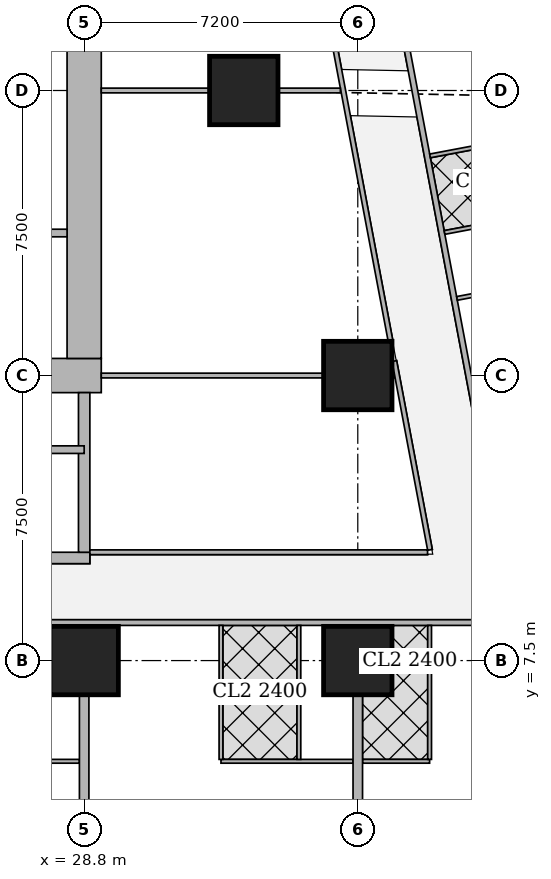
"""IFC4 building model, lengths in metres.
Left out: names, types, materials, properties, quantities, classifications, styles, units other than length and angle.
Written with IfcOpenShell. Run it as: python <this file> out.ifc"""

import sys

from ifc_helpers import new_model, si_unit, direction, frame, frame_2d, origin, origin_2d, place, context, subcontext, project, spatial, rectangle, extrude, element, fill, save


model = new_model("IFC4")
c1 = context("Model", 3, precision=1e-05, world=origin(), true_north=direction((0.0, 1.0)))
c2 = subcontext(c1, "Body", "Model", "MODEL_VIEW")
j1 = project(units=[si_unit("LENGTHUNIT", "METRE"), si_unit("PLANEANGLEUNIT", "RADIAN")], contexts=[c1])
p1 = place(None, origin())
s1 = spatial("IfcSite", under=j1, at=p1, CompositionType="ELEMENT")
p2 = place(p1, origin())
s2 = spatial("IfcBuilding", under=s1, at=p2, CompositionType="ELEMENT")
p3 = place(p2, frame((0.0, 0.0, 42.5)))
s3 = spatial("IfcBuildingStorey", under=s2, at=p3, CompositionType="ELEMENT", Elevation=42.5)
for number, where, z_axis, x_axis in (
    (1, (28.8, 7.5, 0.0), (0.0, 0.0, 1.0), (1.0, 0.0, 0.0)),
    (2, (36.0, 7.5, 0.0), (0.0, 0.0, 1.0), (1.0, 0.0, 0.0)),
    (3, (36.0, 15.0, 0.0), (0.0, 0.0, 1.0), (1.0, 0.0, 0.0)),
    (4, (33.0, 22.5, 0.0), (0.0, 0.0, 1.0), (1.0, 0.0, 0.0)),
):
    element("IfcColumn", number, at=place(p3, frame(where, z_axis=z_axis, x_axis=x_axis)), inside=s3, PredefinedType="COLUMN", context=c2, shape_type="SweptSolid", body=[
        extrude(rectangle(XDim=1.8, YDim=1.8, at=origin_2d()), origin(), (0.0, 0.0, 1.0), 3.75),
    ])
p4 = place(p3, frame((13.95, 15.0, 0.0), z_axis=(0.0, 0.0, 1.0), x_axis=(1.0, 0.0, 0.0)))
e5 = element("IfcWall", 5, at=p4, inside=s3, PredefinedType="SHEAR", context=c2, shape_type="SweptSolid", body=[
    extrude(rectangle(XDim=15.3, YDim=0.9, at=frame_2d((7.65, 0.0))), origin(), (0.0, 0.0, 1.0), 3.75),
])
p5 = place(p4, frame((4.45, 0.0, 0.0)))
e6 = element("IfcOpeningElement", 6, at=p5, cuts=e5, PredefinedType="OPENING", context=c2, shape_type="SweptSolid", body=[
    extrude(rectangle(XDim=1.8, YDim=2.1, at=frame_2d((0.9, 1.05))), frame((0.0, 0.46, 0.0), z_axis=(0.0, -1.0, 0.0), x_axis=(1.0, 0.0, 0.0)), (0.0, 0.0, 1.0), 0.92),
])
p6 = place(p4, frame((10.7, 0.0, 0.0)))
e7 = element("IfcOpeningElement", 7, at=p6, cuts=e5, PredefinedType="OPENING", context=c2, shape_type="SweptSolid", body=[
    extrude(rectangle(XDim=1.1, YDim=2.1, at=frame_2d((0.55, 1.05))), frame((0.0, 0.46, 0.0), z_axis=(0.0, -1.0, 0.0), x_axis=(1.0, 0.0, 0.0)), (0.0, 0.0, 1.0), 0.92),
])
p7 = place(p3, frame((28.8, 15.45, 0.0), z_axis=(0.0, 0.0, 1.0), x_axis=(0.0, 1.0, 0.0)))
e8 = element("IfcWall", 8, at=p7, inside=s3, PredefinedType="SHEAR", context=c2, shape_type="SweptSolid", body=[
    extrude(rectangle(XDim=14.1, YDim=0.9, at=frame_2d((7.05, 0.0))), origin(), (0.0, 0.0, 1.0), 3.75),
])
p8 = place(p3, frame((21.45, 10.2, 0.0), z_axis=(0.0, 0.0, 1.0), x_axis=(1.0, 0.0, 0.0)))
e9 = element("IfcWall", 9, at=p8, inside=s3, PredefinedType="SHEAR", context=c2, shape_type="SweptSolid", body=[
    extrude(rectangle(XDim=7.5, YDim=0.3, at=frame_2d((3.75, 0.0))), origin(), (0.0, 0.0, 1.0), 3.75),
])
p9 = place(p8, frame((0.5, 0.0, 0.0)))
e10 = element("IfcOpeningElement", 10, at=p9, cuts=e9, PredefinedType="OPENING", context=c2, shape_type="SweptSolid", body=[
    extrude(rectangle(XDim=1.1, YDim=2.1, at=frame_2d((0.55, 1.05))), frame((0.0, 0.16, 0.0), z_axis=(0.0, -1.0, 0.0), x_axis=(1.0, 0.0, 0.0)), (0.0, 0.0, 1.0), 0.32),
])
p10 = place(p3, frame((28.8, 10.35, 0.0), z_axis=(0.0, 0.0, 1.0), x_axis=(0.0, 1.0, 0.0)))
e11 = element("IfcWall", 11, at=p10, inside=s3, PredefinedType="SHEAR", context=c2, shape_type="SweptSolid", body=[
    extrude(rectangle(XDim=4.2, YDim=0.3, at=frame_2d((2.1, 0.0))), origin(), (0.0, 0.0, 1.0), 3.75),
])
p11 = place(p3, frame((40.054, 8.5, 0.0), z_axis=(0.0, 0.0, 1.0), x_axis=(-1.0, 0.0, 0.0)))
e12 = element("IfcWall", 12, at=p11, inside=s3, PredefinedType="SOLIDWALL", context=c2, shape_type="SweptSolid", body=[
    extrude(rectangle(XDim=31.704, YDim=0.15, at=frame_2d((15.852, 0.0))), origin(), (0.0, 0.0, 1.0), 3.5),
])
p12 = place(p11, frame((27.321, 0.0, 0.0)))
e13 = element("IfcOpeningElement", 13, at=p12, cuts=e12, PredefinedType="OPENING", context=c2, shape_type="SweptSolid", body=[
    extrude(rectangle(XDim=1.0, YDim=2.1, at=frame_2d((0.5, 1.05))), frame((0.0, 0.085, 0.0), z_axis=(0.0, -1.0, 0.0), x_axis=(1.0, 0.0, 0.0)), (0.0, 0.0, 1.0), 0.17),
])
p13 = place(p11, frame((23.054, 0.0, 0.0)))
e14 = element("IfcOpeningElement", 14, at=p13, cuts=e12, PredefinedType="OPENING", context=c2, shape_type="SweptSolid", body=[
    extrude(rectangle(XDim=1.0, YDim=2.1, at=frame_2d((0.5, 1.05))), frame((0.0, 0.085, 0.0), z_axis=(0.0, -1.0, 0.0), x_axis=(1.0, 0.0, 0.0)), (0.0, 0.0, 1.0), 0.17),
])
p14 = place(p11, frame((15.854, 0.0, 0.0)))
e15 = element("IfcOpeningElement", 15, at=p14, cuts=e12, PredefinedType="OPENING", context=c2, shape_type="SweptSolid", body=[
    extrude(rectangle(XDim=1.0, YDim=2.1, at=frame_2d((0.5, 1.05))), frame((0.0, 0.085, 0.0), z_axis=(0.0, -1.0, 0.0), x_axis=(1.0, 0.0, 0.0)), (0.0, 0.0, 1.0), 0.17),
])
p15 = place(p11, frame((8.654, 0.0, 0.0)))
e16 = element("IfcOpeningElement", 16, at=p15, cuts=e12, PredefinedType="OPENING", context=c2, shape_type="SweptSolid", body=[
    extrude(rectangle(XDim=1.0, YDim=2.1, at=frame_2d((0.5, 1.05))), frame((0.0, 0.085, 0.0), z_axis=(0.0, -1.0, 0.0), x_axis=(1.0, 0.0, 0.0)), (0.0, 0.0, 1.0), 0.17),
])
p16 = place(p11, frame((0.15, 0.0, 0.0)))
e17 = element("IfcOpeningElement", 17, at=p16, cuts=e12, PredefinedType="OPENING", context=c2, shape_type="SweptSolid", body=[
    extrude(rectangle(XDim=1.0, YDim=2.1, at=frame_2d((0.5, 1.05))), frame((0.0, 0.085, 0.0), z_axis=(0.0, -1.0, 0.0), x_axis=(1.0, 0.0, 0.0)), (0.0, 0.0, 1.0), 0.17),
])
p17 = place(p3, frame((33.68, 42.723, 0.0), z_axis=(0.0, 0.0, 1.0), x_axis=(0.185624129307, -0.98262082342, 0.0)))
e18 = element("IfcWall", 18, at=p17, inside=s3, PredefinedType="SOLIDWALL", context=c2, shape_type="SweptSolid", body=[
    extrude(rectangle(XDim=41.051, YDim=0.15, at=frame_2d((20.526, 0.0))), origin(), (0.0, 0.0, 1.0), 2.5),
])
p18 = place(p17, frame((7.73, 0.0, 0.0)))
e19 = element("IfcOpeningElement", 19, at=p18, cuts=e18, PredefinedType="OPENING", context=c2, shape_type="SweptSolid", body=[
    extrude(rectangle(XDim=1.0, YDim=2.1, at=frame_2d((0.5, 1.05))), frame((0.0, 0.085, 0.0), z_axis=(0.0, -1.0, 0.0), x_axis=(1.0, 0.0, 0.0)), (0.0, 0.0, 1.0), 0.17),
])
p19 = place(p17, frame((12.307, 0.0, 0.0)))
e20 = element("IfcOpeningElement", 20, at=p19, cuts=e18, PredefinedType="OPENING", context=c2, shape_type="SweptSolid", body=[
    extrude(rectangle(XDim=1.0, YDim=2.1, at=frame_2d((0.5, 1.05))), frame((0.0, 0.085, 0.0), z_axis=(0.0, -1.0, 0.0), x_axis=(1.0, 0.0, 0.0)), (0.0, 0.0, 1.0), 0.17),
])
p20 = place(p17, frame((19.938, 0.0, 0.0)))
e21 = element("IfcOpeningElement", 21, at=p20, cuts=e18, PredefinedType="OPENING", context=c2, shape_type="SweptSolid", body=[
    extrude(rectangle(XDim=1.0, YDim=2.1, at=frame_2d((0.5, 1.05))), frame((0.0, 0.085, 0.0), z_axis=(0.0, -1.0, 0.0), x_axis=(1.0, 0.0, 0.0)), (0.0, 0.0, 1.0), 0.17),
])
p21 = place(p17, frame((32.193, 0.0, 0.0)))
e22 = element("IfcOpeningElement", 22, at=p21, cuts=e18, PredefinedType="OPENING", context=c2, shape_type="SweptSolid", body=[
    extrude(rectangle(XDim=1.0, YDim=2.1, at=frame_2d((0.5, 1.05))), frame((0.0, 0.085, 0.0), z_axis=(0.0, -1.0, 0.0), x_axis=(1.0, 0.0, 0.0)), (0.0, 0.0, 1.0), 0.17),
])
p22 = place(p3, frame((28.675, 4.85, 0.0), z_axis=(0.0, 0.0, 1.0), x_axis=(-1.0, 0.0, 0.0)))
e23 = element("IfcWall", 23, at=p22, inside=s3, PredefinedType="PARTITIONING", context=c2, shape_type="SweptSolid", body=[
    extrude(rectangle(XDim=3.475, YDim=0.1, at=frame_2d((1.738, 0.0))), origin(), (0.0, 0.0, 1.0), 3.5),
])
p23 = place(p22, frame((2.0, 0.0, 0.0)))
e24 = element("IfcOpeningElement", 24, at=p23, cuts=e23, PredefinedType="OPENING", context=c2, shape_type="SweptSolid", body=[
    extrude(rectangle(XDim=0.9, YDim=2.1, at=frame_2d((0.45, 1.05))), frame((0.0, 0.06, 0.0), z_axis=(0.0, -1.0, 0.0), x_axis=(1.0, 0.0, 0.0)), (0.0, 0.0, 1.0), 0.12),
])
p24 = place(p22, frame((0.2, 0.0, 0.0)))
e25 = element("IfcOpeningElement", 25, at=p24, cuts=e23, PredefinedType="OPENING", context=c2, shape_type="SweptSolid", body=[
    extrude(rectangle(XDim=0.9, YDim=2.1, at=frame_2d((0.45, 1.05))), frame((0.0, 0.06, 0.0), z_axis=(0.0, -1.0, 0.0), x_axis=(1.0, 0.0, 0.0)), (0.0, 0.0, 1.0), 0.12),
])
p25 = place(p3, frame((35.875, 4.85, 0.0), z_axis=(0.0, 0.0, 1.0), x_axis=(-1.0, 0.0, 0.0)))
e26 = element("IfcWall", 26, at=p25, inside=s3, PredefinedType="PARTITIONING", context=c2, shape_type="SweptSolid", body=[
    extrude(rectangle(XDim=3.475, YDim=0.1, at=frame_2d((1.738, 0.0))), origin(), (0.0, 0.0, 1.0), 3.5),
])
p26 = place(p25, frame((2.0, 0.0, 0.0)))
e27 = element("IfcOpeningElement", 27, at=p26, cuts=e26, PredefinedType="OPENING", context=c2, shape_type="SweptSolid", body=[
    extrude(rectangle(XDim=0.9, YDim=2.1, at=frame_2d((0.45, 1.05))), frame((0.0, 0.06, 0.0), z_axis=(0.0, -1.0, 0.0), x_axis=(1.0, 0.0, 0.0)), (0.0, 0.0, 1.0), 0.12),
])
p27 = place(p25, frame((0.2, 0.0, 0.0)))
e28 = element("IfcOpeningElement", 28, at=p27, cuts=e26, PredefinedType="OPENING", context=c2, shape_type="SweptSolid", body=[
    extrude(rectangle(XDim=0.9, YDim=2.1, at=frame_2d((0.45, 1.05))), frame((0.0, 0.06, 0.0), z_axis=(0.0, -1.0, 0.0), x_axis=(1.0, 0.0, 0.0)), (0.0, 0.0, 1.0), 0.12),
])
for number, where, z_axis, x_axis in (
    (29, (32.4, 4.9, 0.0), (0.0, 0.0, 1.0), (0.0, 1.0, 0.0)),
    (30, (34.45, 4.9, 0.0), (0.0, 0.0, 1.0), (0.0, 1.0, 0.0)),
):
    element("IfcWall", number, at=place(p3, frame(where, z_axis=z_axis, x_axis=x_axis)), inside=s3, PredefinedType="PARTITIONING", context=c2, shape_type="SweptSolid", body=[
        extrude(rectangle(XDim=3.525, YDim=0.1, at=frame_2d((1.763, 0.0))), origin(), (0.0, 0.0, 1.0), 3.5),
    ])
p28 = place(p3, frame((28.8, 3.65, 0.0), z_axis=(0.0, 0.0, 1.0), x_axis=(0.0, 1.0, 0.0)))
e31 = element("IfcWall", 31, at=p28, inside=s3, PredefinedType="SOLIDWALL", context=c2, shape_type="SweptSolid", body=[
    extrude(rectangle(XDim=2.949, YDim=0.25, at=frame_2d((1.475, 0.0))), origin(), (0.0, 0.0, 1.0), 3.5),
])
p29 = place(p3, frame((37.89, 4.85, 0.0), z_axis=(0.0, 0.0, 1.0), x_axis=(-1.0, 0.0, 0.0)))
e32 = element("IfcWall", 32, at=p29, inside=s3, PredefinedType="PARTITIONING", context=c2, shape_type="SweptSolid", body=[
    extrude(rectangle(XDim=1.765, YDim=0.1, at=frame_2d((0.882, 0.0))), origin(), (0.0, 0.0, 1.0), 3.5),
])
p30 = place(p29, frame((0.49, 0.0, 0.0)))
e33 = element("IfcOpeningElement", 33, at=p30, cuts=e32, PredefinedType="OPENING", context=c2, shape_type="SweptSolid", body=[
    extrude(rectangle(XDim=0.9, YDim=2.1, at=frame_2d((0.45, 1.05))), frame((0.0, 0.06, 0.0), z_axis=(0.0, -1.0, 0.0), x_axis=(1.0, 0.0, 0.0)), (0.0, 0.0, 1.0), 0.12),
])
p31 = place(p3, frame((37.89, 4.9, 0.0), z_axis=(0.0, 0.0, 1.0), x_axis=(0.0, 1.0, 0.0)))
e34 = element("IfcWall", 34, at=p31, inside=s3, PredefinedType="PARTITIONING", context=c2, shape_type="SweptSolid", body=[
    extrude(rectangle(XDim=3.525, YDim=0.1, at=frame_2d((1.763, 0.0))), origin(), (0.0, 0.0, 1.0), 3.5),
])
p32 = place(p3, frame((36.0, 3.65, 0.0), z_axis=(0.0, 0.0, 1.0), x_axis=(0.0, 1.0, 0.0)))
e35 = element("IfcWall", 35, at=p32, inside=s3, PredefinedType="SOLIDWALL", context=c2, shape_type="SweptSolid", body=[
    extrude(rectangle(XDim=2.949, YDim=0.25, at=frame_2d((1.475, 0.0))), origin(), (0.0, 0.0, 1.0), 3.5),
])
p33 = place(p3, frame((41.365, 21.433, 0.0), z_axis=(0.0, 0.0, 1.0), x_axis=(-0.982638553676, -0.185530247748, 0.0)))
e36 = element("IfcWall", 36, at=p33, inside=s3, PredefinedType="PARTITIONING", context=c2, shape_type="SweptSolid", body=[
    extrude(rectangle(XDim=3.525, YDim=0.1, at=frame_2d((1.763, 0.0))), origin(), (0.0, 0.0, 1.0), 3.5),
])
p34 = place(p3, frame((42.073, 17.683, 0.0), z_axis=(0.0, 0.0, 1.0), x_axis=(-0.982626628545, -0.185593396635, 0.0)))
e37 = element("IfcWall", 37, at=p34, inside=s3, PredefinedType="PARTITIONING", context=c2, shape_type="SweptSolid", body=[
    extrude(rectangle(XDim=3.524, YDim=0.1, at=frame_2d((1.762, 0.0))), origin(), (0.0, 0.0, 1.0), 3.5),
])
p35 = place(p3, frame((41.745, 19.418, 0.0), z_axis=(0.0, 0.0, 1.0), x_axis=(-0.982629014545, -0.18558076348, 0.0)))
e38 = element("IfcWall", 38, at=p35, inside=s3, PredefinedType="PARTITIONING", context=c2, shape_type="SweptSolid", body=[
    extrude(rectangle(XDim=3.524, YDim=0.1, at=frame_2d((1.762, 0.0))), origin(), (0.0, 0.0, 1.0), 3.5),
])
p36 = place(p3, frame((28.95, 10.35, 0.0), z_axis=(0.0, 0.0, 1.0), x_axis=(1.0, 0.0, 0.0)))
e39 = element("IfcWall", 39, at=p36, inside=s3, PredefinedType="PARTITIONING", context=c2, shape_type="SweptSolid", body=[
    extrude(rectangle(XDim=8.886, YDim=0.125, at=frame_2d((4.443, 0.0))), origin(), (0.0, 0.0, 1.0), 3.5),
])
p37 = place(p3, frame((37.9, 10.413, 0.0), z_axis=(0.0, 0.0, 1.0), x_axis=(-0.185527510388, 0.982639070508, 0.0)))
e40 = element("IfcWall", 40, at=p37, inside=s3, PredefinedType="PARTITIONING", context=c2, shape_type="SweptSolid", body=[
    extrude(rectangle(XDim=5.056, YDim=0.125, at=frame_2d((2.528, 0.0))), origin(), (0.0, 0.0, 1.0), 3.5),
])
p38 = place(p37, frame((0.708, 0.0, 0.0)))
e41 = element("IfcOpeningElement", 41, at=p38, cuts=e40, PredefinedType="OPENING", context=c2, shape_type="SweptSolid", body=[
    extrude(rectangle(XDim=1.0, YDim=2.1, at=frame_2d((0.5, 1.05))), frame((0.0, 0.073, 0.0), z_axis=(0.0, -1.0, 0.0), x_axis=(1.0, 0.0, 0.0)), (0.0, 0.0, 1.0), 0.145),
])
p39 = place(p3, frame((36.861, 15.913, 0.0), z_axis=(0.0, 0.0, 1.0), x_axis=(-0.185588307143, 0.982627589808, 0.0)))
e42 = element("IfcWall", 42, at=p39, inside=s3, PredefinedType="PARTITIONING", context=c2, shape_type="SweptSolid", body=[
    extrude(rectangle(XDim=19.005, YDim=0.125, at=frame_2d((9.502, 0.0))), origin(), (0.0, 0.0, 1.0), 2.5),
])
p40 = place(p39, frame((0.25, 0.0, 0.0)))
e43 = element("IfcOpeningElement", 43, at=p40, cuts=e42, PredefinedType="OPENING", context=c2, shape_type="SweptSolid", body=[
    extrude(rectangle(XDim=1.0, YDim=2.1, at=frame_2d((0.5, 1.05))), frame((0.0, 0.073, 0.0), z_axis=(0.0, -1.0, 0.0), x_axis=(1.0, 0.0, 0.0)), (0.0, 0.0, 1.0), 0.145),
])
p41 = place(p39, frame((7.527, 0.0, 0.0)))
e44 = element("IfcOpeningElement", 44, at=p41, cuts=e42, PredefinedType="OPENING", context=c2, shape_type="SweptSolid", body=[
    extrude(rectangle(XDim=1.0, YDim=2.1, at=frame_2d((0.5, 1.05))), frame((0.0, 0.073, 0.0), z_axis=(0.0, -1.0, 0.0), x_axis=(1.0, 0.0, 0.0)), (0.0, 0.0, 1.0), 0.145),
])
p42 = place(p39, frame((15.5, 0.0, 0.0)))
e45 = element("IfcOpeningElement", 45, at=p42, cuts=e42, PredefinedType="OPENING", context=c2, shape_type="SweptSolid", body=[
    extrude(rectangle(XDim=1.0, YDim=2.1, at=frame_2d((0.5, 1.05))), frame((0.0, 0.073, 0.0), z_axis=(0.0, -1.0, 0.0), x_axis=(1.0, 0.0, 0.0)), (0.0, 0.0, 1.0), 0.145),
])
p43 = place(p3, frame((29.25, 15.0, 0.0), z_axis=(0.0, 0.0, 1.0), x_axis=(1.0, 0.0, 0.0)))
e46 = element("IfcWall", 46, at=p43, inside=s3, PredefinedType="PARTITIONING", context=c2, shape_type="SweptSolid", body=[
    extrude(rectangle(XDim=5.849, YDim=0.125, at=frame_2d((2.925, 0.0))), origin(), (0.0, 0.0, 1.0), 3.5),
])
p44 = place(p3, frame((36.901, 15.0, 0.0), z_axis=(0.0, 0.0, 1.0), x_axis=(1.0, 0.0, 0.0)))
e47 = element("IfcWall", 47, at=p44, inside=s3, PredefinedType="PARTITIONING", context=c2, shape_type="SweptSolid", body=[
    extrude(rectangle(XDim=0.057, YDim=0.125, at=frame_2d((0.029, 0.0))), origin(), (0.0, 0.0, 1.0), 3.5),
])
p45 = place(p3, frame((29.25, 22.5, 0.0), z_axis=(0.0, 0.0, 1.0), x_axis=(1.0, 0.0, 0.0)))
e48 = element("IfcWall", 48, at=p45, inside=s3, PredefinedType="PARTITIONING", context=c2, shape_type="SweptSolid", body=[
    extrude(rectangle(XDim=2.849, YDim=0.125, at=frame_2d((1.425, 0.0))), origin(), (0.0, 0.0, 1.0), 3.5),
])
p46 = place(p3, frame((33.901, 22.5, 0.0), z_axis=(0.0, 0.0, 1.0), x_axis=(1.0, 0.0, 0.0)))
e49 = element("IfcWall", 49, at=p46, inside=s3, PredefinedType="PARTITIONING", context=c2, shape_type="SweptSolid", body=[
    extrude(rectangle(XDim=1.641, YDim=0.125, at=frame_2d((0.821, 0.0))), origin(), (0.0, 0.0, 1.0), 2.5),
])
p47 = place(p3, frame((23.0, 13.05, 0.0), z_axis=(0.0, 0.0, 1.0), x_axis=(1.0, 0.0, 0.0)))
e50 = element("IfcWall", 50, at=p47, inside=s3, PredefinedType="SHEAR", context=c2, shape_type="SweptSolid", body=[
    extrude(rectangle(XDim=5.8, YDim=0.2, at=frame_2d((2.9, 0.0))), origin(), (0.0, 0.0, 1.0), 3.75),
])
p48 = place(p3, frame((27.4, 18.75, 0.0), z_axis=(0.0, 0.0, 1.0), x_axis=(1.0, 0.0, 0.0)))
e51 = element("IfcWall", 51, at=p48, inside=s3, PredefinedType="SOLIDWALL", context=c2, shape_type="SweptSolid", body=[
    extrude(rectangle(XDim=0.95, YDim=0.2, at=frame_2d((0.475, 0.0))), origin(), (0.0, 0.0, 1.0), 3.5),
])
p49 = place(p24, origin())
e52 = element("IfcDoor", 52, at=p49, inside=s3, OperationType="SINGLE_SWING_RIGHT", PredefinedType="DOOR", context=c2, shape_type="SweptSolid", body=[
    extrude(rectangle(XDim=0.9, YDim=2.1, at=frame_2d((0.45, 1.05))), frame((0.0, 0.025, 0.0), z_axis=(0.0, -1.0, 0.0), x_axis=(1.0, 0.0, 0.0)), (0.0, 0.0, 1.0), 0.05),
])
fill(e25, e52)
p50 = place(p26, origin())
e53 = element("IfcDoor", 53, at=p50, inside=s3, OperationType="SINGLE_SWING_LEFT", PredefinedType="DOOR", context=c2, shape_type="SweptSolid", body=[
    extrude(rectangle(XDim=0.9, YDim=2.1, at=frame_2d((0.45, 1.05))), frame((0.0, 0.025, 0.0), z_axis=(0.0, -1.0, 0.0), x_axis=(1.0, 0.0, 0.0)), (0.0, 0.0, 1.0), 0.05),
])
fill(e27, e53)
p51 = place(p27, origin())
e54 = element("IfcDoor", 54, at=p51, inside=s3, OperationType="SINGLE_SWING_RIGHT", PredefinedType="DOOR", context=c2, shape_type="SweptSolid", body=[
    extrude(rectangle(XDim=0.9, YDim=2.1, at=frame_2d((0.45, 1.05))), frame((0.0, 0.025, 0.0), z_axis=(0.0, -1.0, 0.0), x_axis=(1.0, 0.0, 0.0)), (0.0, 0.0, 1.0), 0.05),
])
fill(e28, e54)
p52 = place(p15, origin())
e55 = element("IfcDoor", 55, at=p52, inside=s3, OperationType="SINGLE_SWING_LEFT", PredefinedType="DOOR", context=c2, shape_type="SweptSolid", body=[
    extrude(rectangle(XDim=1.0, YDim=2.1, at=frame_2d((0.5, 1.05))), frame((0.0, 0.025, 0.0), z_axis=(0.0, -1.0, 0.0), x_axis=(1.0, 0.0, 0.0)), (0.0, 0.0, 1.0), 0.05),
])
fill(e16, e55)
p53 = place(p30, origin())
e56 = element("IfcDoor", 56, at=p53, inside=s3, OperationType="SINGLE_SWING_LEFT", PredefinedType="DOOR", context=c2, shape_type="SweptSolid", body=[
    extrude(rectangle(XDim=0.9, YDim=2.1, at=frame_2d((0.45, 1.05))), frame((0.0, 0.025, 0.0), z_axis=(0.0, -1.0, 0.0), x_axis=(1.0, 0.0, 0.0)), (0.0, 0.0, 1.0), 0.05),
])
fill(e33, e56)
p54 = place(p16, origin())
e57 = element("IfcDoor", 57, at=p54, inside=s3, OperationType="SINGLE_SWING_LEFT", PredefinedType="DOOR", context=c2, shape_type="SweptSolid", body=[
    extrude(rectangle(XDim=1.0, YDim=2.1, at=frame_2d((0.5, 1.05))), frame((0.0, 0.025, 0.0), z_axis=(0.0, -1.0, 0.0), x_axis=(1.0, 0.0, 0.0)), (0.0, 0.0, 1.0), 0.05),
])
fill(e17, e57)
p55 = place(p20, origin())
e58 = element("IfcDoor", 58, at=p55, inside=s3, OperationType="SINGLE_SWING_LEFT", PredefinedType="DOOR", context=c2, shape_type="SweptSolid", body=[
    extrude(rectangle(XDim=1.0, YDim=2.1, at=frame_2d((0.5, 1.05))), frame((0.0, 0.025, 0.0), z_axis=(0.0, -1.0, 0.0), x_axis=(1.0, 0.0, 0.0)), (0.0, 0.0, 1.0), 0.05),
])
fill(e21, e58)
p56 = place(p38, origin())
e59 = element("IfcDoor", 59, at=p56, inside=s3, OperationType="SINGLE_SWING_LEFT", PredefinedType="DOOR", context=c2, shape_type="SweptSolid", body=[
    extrude(rectangle(XDim=1.0, YDim=2.1, at=frame_2d((0.5, 1.05))), frame((0.0, 0.025, 0.0), z_axis=(0.0, -1.0, 0.0), x_axis=(1.0, 0.0, 0.0)), (0.0, 0.0, 1.0), 0.05),
])
fill(e41, e59)
p57 = place(p40, origin())
e60 = element("IfcDoor", 60, at=p57, inside=s3, OperationType="SINGLE_SWING_LEFT", PredefinedType="DOOR", context=c2, shape_type="SweptSolid", body=[
    extrude(rectangle(XDim=1.0, YDim=2.1, at=frame_2d((0.5, 1.05))), frame((0.0, 0.025, 0.0), z_axis=(0.0, -1.0, 0.0), x_axis=(1.0, 0.0, 0.0)), (0.0, 0.0, 1.0), 0.05),
])
fill(e43, e60)
p58 = place(p41, origin())
e61 = element("IfcDoor", 61, at=p58, inside=s3, OperationType="SINGLE_SWING_LEFT", PredefinedType="DOOR", context=c2, shape_type="SweptSolid", body=[
    extrude(rectangle(XDim=1.0, YDim=2.1, at=frame_2d((0.5, 1.05))), frame((0.0, 0.025, 0.0), z_axis=(0.0, -1.0, 0.0), x_axis=(1.0, 0.0, 0.0)), (0.0, 0.0, 1.0), 0.05),
])
fill(e44, e61)
save(model, sys.argv[1])
